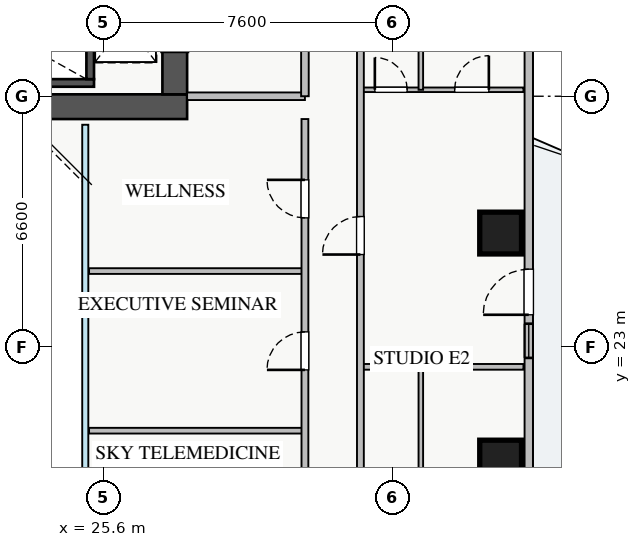
"""IFC4 building model, lengths in metres.
Left out: names, types, materials, properties, quantities, classifications, styles, units other than length and angle.
Written with IfcOpenShell. Run it as: python <this file> out.ifc"""

import sys

from ifc_helpers import new_model, si_unit, direction, frame, frame_2d, origin, origin_2d, place, context, subcontext, project, spatial, rectangle, extrude, source, transform, mapped, element, fill, save


model = new_model("IFC4")
c1 = context("Model", 3, precision=1e-05, world=origin(), true_north=direction((0.0, 1.0)))
c2 = subcontext(c1, "Body", "Model", "MODEL_VIEW")
j1 = project(units=[si_unit("LENGTHUNIT", "METRE"), si_unit("PLANEANGLEUNIT", "RADIAN")], contexts=[c1])
p1 = place(None, origin())
s1 = spatial("IfcSite", under=j1, at=p1, CompositionType="ELEMENT")
p2 = place(p1, origin())
s2 = spatial("IfcBuilding", under=s1, at=p2, CompositionType="ELEMENT")
p3 = place(p2, frame((0.0, 0.0, 106.75)))
s3 = spatial("IfcBuildingStorey", under=s2, at=p3, CompositionType="ELEMENT", Elevation=106.75)
p4 = place(p3, frame((18.2, 29.95, 0.0), z_axis=(0.0, 0.0, 1.0), x_axis=(1.0, 0.0, 0.0)))
e1 = element("IfcWall", 1, at=p4, inside=s3, PredefinedType="SHEAR", context=c2, shape_type="SweptSolid", body=[
    extrude(rectangle(XDim=7.15, YDim=0.2, at=frame_2d((3.575, 0.0))), origin(), (0.0, 0.0, 1.0), 3.25),
])
p5 = place(p3, frame((25.25, 30.05, 0.0), z_axis=(0.0, 0.0, 1.0), x_axis=(0.0, 1.0, 0.0)))
e2 = element("IfcWall", 2, at=p5, inside=s3, PredefinedType="SHEAR", context=c2, shape_type="SweptSolid", body=[
    extrude(rectangle(XDim=2.94, YDim=0.2, at=frame_2d((1.47, 0.0))), origin(), (0.0, 0.0, 1.0), 3.25),
])
p6 = place(p3, frame((10.2, 29.325, 0.0), z_axis=(0.0, 0.0, 1.0), x_axis=(1.0, 0.0, 0.0)))
e3 = element("IfcWall", 3, at=p6, inside=s3, PredefinedType="SHEAR", context=c2, shape_type="SweptSolid", body=[
    extrude(rectangle(XDim=17.6, YDim=0.65, at=frame_2d((8.8, 0.0))), origin(), (0.0, 0.0, 1.0), 3.25),
])
p7 = place(p3, frame((27.475, 29.65, 0.0), z_axis=(0.0, 0.0, 1.0), x_axis=(0.0, 1.0, 0.0)))
e4 = element("IfcWall", 4, at=p7, inside=s3, PredefinedType="SHEAR", context=c2, shape_type="SweptSolid", body=[
    extrude(rectangle(XDim=5.9, YDim=0.65, at=frame_2d((2.95, 0.0))), origin(), (0.0, 0.0, 1.0), 3.25),
])
p8 = place(p7, frame((1.1, 0.0, 0.0)))
e5 = element("IfcOpeningElement", 5, at=p8, cuts=e4, PredefinedType="OPENING", context=c2, shape_type="SweptSolid", body=[
    extrude(rectangle(XDim=1.3, YDim=2.05, at=frame_2d((0.65, 1.025))), frame((0.0, 0.335, 0.0), z_axis=(0.0, -1.0, 0.0), x_axis=(1.0, 0.0, 0.0)), (0.0, 0.0, 1.0), 0.67),
])
m1 = source(origin(), c2, "Body", "SweptSolid", [
    extrude(rectangle(XDim=1.1, YDim=1.1, at=origin_2d()), origin(), (0.0, 0.0, 1.0), 3.25),
])
for number, where, z_axis, x_axis in (
    (6, (36.05, 20.0, 0.0), (0.0, 0.0, 1.0), (1.0, 0.0, 0.0)),
    (7, (36.05, 26.0, 0.0), (0.0, 0.0, 1.0), (1.0, 0.0, 0.0)),
):
    element("IfcColumn", number, at=place(p3, frame(where, z_axis=z_axis, x_axis=x_axis)), inside=s3, PredefinedType="COLUMN", context=c2, shape_type="MappedRepresentation", body=[
        mapped(m1, transform((0.0, 0.0, 0.0), x_axis=(1.0, 0.0, 0.0), y_axis=(0.0, 1.0, 0.0), z_axis=(0.0, 0.0, 1.0), scale=1.0)),
    ])
p9 = place(p3, frame((36.79, 10.55, 0.0), z_axis=(0.0, 0.0, 1.0), x_axis=(0.0, 1.0, 0.0)))
e8 = element("IfcWall", 8, at=p9, inside=s3, PredefinedType="STANDARD", context=c2, shape_type="SweptSolid", body=[
    extrude(rectangle(XDim=24.9, YDim=0.22, at=frame_2d((12.45, 0.0))), origin(), (0.0, 0.0, 1.0), 2.61),
])
p10 = place(p9, frame((13.3, 0.0, 0.0)))
e9 = element("IfcOpeningElement", 9, at=p10, cuts=e8, PredefinedType="OPENING", context=c2, shape_type="SweptSolid", body=[
    extrude(rectangle(XDim=1.2, YDim=2.1, at=frame_2d((0.6, 1.05))), frame((0.0, 0.12, 0.0), z_axis=(0.0, -1.0, 0.0), x_axis=(1.0, 0.0, 0.0)), (0.0, 0.0, 1.0), 0.24),
])
p11 = place(p9, frame((1.912, 0.0, 0.9)))
e10 = element("IfcOpeningElement", 10, at=p11, cuts=e8, PredefinedType="OPENING", context=c2, shape_type="SweptSolid", body=[
    extrude(rectangle(XDim=2.4, YDim=1.48, at=frame_2d((1.2, 0.74))), frame((0.0, 0.12, 0.0), z_axis=(0.0, -1.0, 0.0), x_axis=(1.0, 0.0, 0.0)), (0.0, 0.0, 1.0), 0.24),
])
p12 = place(p9, frame((20.737, 0.0, 0.9)))
e11 = element("IfcOpeningElement", 11, at=p12, cuts=e8, PredefinedType="OPENING", context=c2, shape_type="SweptSolid", body=[
    extrude(rectangle(XDim=2.1, YDim=1.48, at=frame_2d((1.05, 0.74))), frame((0.0, 0.12, 0.0), z_axis=(0.0, -1.0, 0.0), x_axis=(1.0, 0.0, 0.0)), (0.0, 0.0, 1.0), 0.24),
])
p13 = place(p9, frame((12.165, 0.0, 0.9)))
e12 = element("IfcOpeningElement", 12, at=p13, cuts=e8, PredefinedType="OPENING", context=c2, shape_type="SweptSolid", body=[
    extrude(rectangle(XDim=0.9, YDim=1.2, at=frame_2d((0.45, 0.6))), frame((0.0, 0.12, 0.0), z_axis=(0.0, -1.0, 0.0), x_axis=(1.0, 0.0, 0.0)), (0.0, 0.0, 1.0), 0.24),
])
p14 = place(p3, frame((27.8, 29.6, 0.0), z_axis=(0.0, 0.0, 1.0), x_axis=(1.0, 0.0, 0.0)))
e13 = element("IfcWall", 13, at=p14, inside=s3, PredefinedType="PARTITIONING", context=c2, shape_type="SweptSolid", body=[
    extrude(rectangle(XDim=3.1, YDim=0.2, at=frame_2d((1.55, 0.0))), origin(), (0.0, 0.0, 1.0), 3.07),
])
p15 = place(p3, frame((30.9, 29.6, 0.0), z_axis=(0.0, 0.0, 1.0), x_axis=(0.0, 1.0, 0.0)))
e14 = element("IfcWall", 14, at=p15, inside=s3, PredefinedType="PARTITIONING", context=c2, shape_type="SweptSolid", body=[
    extrude(rectangle(XDim=3.9, YDim=0.2, at=frame_2d((1.95, 0.0))), origin(), (0.0, 0.0, 1.0), 3.07),
])
p16 = place(p15, frame((1.4, 0.0, 0.0)))
e15 = element("IfcOpeningElement", 15, at=p16, cuts=e14, PredefinedType="OPENING", context=c2, shape_type="SweptSolid", body=[
    extrude(rectangle(XDim=1.1, YDim=2.05, at=frame_2d((0.55, 1.025))), frame((0.0, 0.11, 0.0), z_axis=(0.0, -1.0, 0.0), x_axis=(1.0, 0.0, 0.0)), (0.0, 0.0, 1.0), 0.22),
])
p17 = place(p3, frame((33.95, 16.75, 0.0), z_axis=(0.0, 0.0, 1.0), x_axis=(0.0, 1.0, 0.0)))
e16 = element("IfcWall", 16, at=p17, inside=s3, PredefinedType="PLUMBINGWALL", context=c2, shape_type="SweptSolid", body=[
    extrude(rectangle(XDim=5.73, YDim=0.12, at=frame_2d((2.865, 0.0))), origin(), (0.0, 0.0, 1.0), 3.07),
])
p18 = place(p3, frame((32.36, 29.77, 0.0), z_axis=(0.0, 0.0, 1.0), x_axis=(1.0, 0.0, 0.0)))
e17 = element("IfcWall", 17, at=p18, inside=s3, PredefinedType="PLUMBINGWALL", context=c2, shape_type="SweptSolid", body=[
    extrude(rectangle(XDim=4.29, YDim=0.12, at=frame_2d((2.145, 0.0))), origin(), (0.0, 0.0, 1.0), 3.07),
])
p19 = place(p18, frame((0.38, 0.0, 0.0)))
e18 = element("IfcOpeningElement", 18, at=p19, cuts=e17, PredefinedType="OPENING", context=c2, shape_type="SweptSolid", body=[
    extrude(rectangle(XDim=0.85, YDim=2.05, at=frame_2d((0.425, 1.025))), frame((0.0, 0.07, 0.0), z_axis=(0.0, -1.0, 0.0), x_axis=(1.0, 0.0, 0.0)), (0.0, 0.0, 1.0), 0.14),
])
p20 = place(p18, frame((2.48, 0.0, 0.0)))
e19 = element("IfcOpeningElement", 19, at=p20, cuts=e17, PredefinedType="OPENING", context=c2, shape_type="SweptSolid", body=[
    extrude(rectangle(XDim=0.9, YDim=2.05, at=frame_2d((0.45, 1.025))), frame((0.0, 0.07, 0.0), z_axis=(0.0, -1.0, 0.0), x_axis=(1.0, 0.0, 0.0)), (0.0, 0.0, 1.0), 0.14),
])
p21 = place(p3, frame((33.95, 29.77, 0.0), z_axis=(0.0, 0.0, 1.0), x_axis=(0.0, 1.0, 0.0)))
e20 = element("IfcWall", 20, at=p21, inside=s3, PredefinedType="PLUMBINGWALL", context=c2, shape_type="SweptSolid", body=[
    extrude(rectangle(XDim=6.21, YDim=0.12, at=frame_2d((3.105, 0.0))), origin(), (0.0, 0.0, 1.0), 3.07),
])
p22 = place(p3, frame((32.36, 22.48, 0.0), z_axis=(0.0, 0.0, 1.0), x_axis=(1.0, 0.0, 0.0)))
e21 = element("IfcWall", 21, at=p22, inside=s3, PredefinedType="PARTITIONING", context=c2, shape_type="SweptSolid", body=[
    extrude(rectangle(XDim=4.29, YDim=0.15, at=frame_2d((2.145, 0.0))), origin(), (0.0, 0.0, 1.0), 3.07),
])
p23 = place(p3, frame((32.36, 8.3, 0.0), z_axis=(0.0, 0.0, 1.0), x_axis=(0.0, 1.0, 0.0)))
e22 = element("IfcWall", 22, at=p23, inside=s3, PredefinedType="PARTITIONING", context=c2, shape_type="SweptSolid", body=[
    extrude(rectangle(XDim=29.4, YDim=0.18, at=frame_2d((14.7, 0.0))), origin(), (0.0, 0.0, 1.0), 3.07),
])
p24 = place(p23, frame((28.08, 0.0, 0.0)))
e23 = element("IfcOpeningElement", 23, at=p24, cuts=e22, PredefinedType="OPENING", context=c2, shape_type="SweptSolid", body=[
    extrude(rectangle(XDim=0.9, YDim=2.05, at=frame_2d((0.45, 1.025))), frame((0.0, 0.1, 0.0), z_axis=(0.0, -1.0, 0.0), x_axis=(1.0, 0.0, 0.0)), (0.0, 0.0, 1.0), 0.2),
])
p25 = place(p23, frame((0.42, 0.0, 0.0)))
e24 = element("IfcOpeningElement", 24, at=p25, cuts=e22, PredefinedType="OPENING", context=c2, shape_type="SweptSolid", body=[
    extrude(rectangle(XDim=0.9, YDim=2.05, at=frame_2d((0.45, 1.025))), frame((0.0, 0.1, 0.0), z_axis=(0.0, -1.0, 0.0), x_axis=(1.0, 0.0, 0.0)), (0.0, 0.0, 1.0), 0.2),
])
p26 = place(p23, frame((4.395, 0.0, 0.0)))
e25 = element("IfcOpeningElement", 25, at=p26, cuts=e22, PredefinedType="OPENING", context=c2, shape_type="SweptSolid", body=[
    extrude(rectangle(XDim=1.0, YDim=2.05, at=frame_2d((0.5, 1.025))), frame((0.0, 0.1, 0.0), z_axis=(0.0, -1.0, 0.0), x_axis=(1.0, 0.0, 0.0)), (0.0, 0.0, 1.0), 0.2),
])
p27 = place(p23, frame((17.135, 0.0, 0.0)))
e26 = element("IfcOpeningElement", 26, at=p27, cuts=e22, PredefinedType="OPENING", context=c2, shape_type="SweptSolid", body=[
    extrude(rectangle(XDim=1.0, YDim=2.05, at=frame_2d((0.5, 1.025))), frame((0.0, 0.1, 0.0), z_axis=(0.0, -1.0, 0.0), x_axis=(1.0, 0.0, 0.0)), (0.0, 0.0, 1.0), 0.2),
])
for number, where, z_axis, x_axis in (
    (27, (25.22, 20.8, 0.0), (0.0, 0.0, 1.0), (1.0, 0.0, 0.0)),
    (28, (25.22, 25.0, 0.0), (0.0, 0.0, 1.0), (1.0, 0.0, 0.0)),
):
    element("IfcWall", number, at=place(p3, frame(where, z_axis=z_axis, x_axis=x_axis)), inside=s3, PredefinedType="PARTITIONING", context=c2, shape_type="SweptSolid", body=[
        extrude(rectangle(XDim=5.68, YDim=0.15, at=frame_2d((2.84, 0.0))), origin(), (0.0, 0.0, 1.0), 3.07),
    ])
p28 = place(p3, frame((30.9, 17.0, 0.0), z_axis=(0.0, 0.0, 1.0), x_axis=(0.0, 1.0, 0.0)))
e29 = element("IfcWall", 29, at=p28, inside=s3, PredefinedType="PARTITIONING", context=c2, shape_type="SweptSolid", body=[
    extrude(rectangle(XDim=12.0, YDim=0.18, at=frame_2d((6.0, 0.0))), origin(), (0.0, 0.0, 1.0), 3.07),
])
p29 = place(p28, frame((1.4, 0.0, 0.0)))
e30 = element("IfcOpeningElement", 30, at=p29, cuts=e29, PredefinedType="OPENING", context=c2, shape_type="SweptSolid", body=[
    extrude(rectangle(XDim=1.0, YDim=2.05, at=frame_2d((0.5, 1.025))), frame((0.0, 0.1, 0.0), z_axis=(0.0, -1.0, 0.0), x_axis=(1.0, 0.0, 0.0)), (0.0, 0.0, 1.0), 0.2),
])
p30 = place(p28, frame((5.4, 0.0, 0.0)))
e31 = element("IfcOpeningElement", 31, at=p30, cuts=e29, PredefinedType="OPENING", context=c2, shape_type="SweptSolid", body=[
    extrude(rectangle(XDim=1.0, YDim=2.05, at=frame_2d((0.5, 1.025))), frame((0.0, 0.1, 0.0), z_axis=(0.0, -1.0, 0.0), x_axis=(1.0, 0.0, 0.0)), (0.0, 0.0, 1.0), 0.2),
])
p31 = place(p28, frame((9.4, 0.0, 0.0)))
e32 = element("IfcOpeningElement", 32, at=p31, cuts=e29, PredefinedType="OPENING", context=c2, shape_type="SweptSolid", body=[
    extrude(rectangle(XDim=1.0, YDim=2.05, at=frame_2d((0.5, 1.025))), frame((0.0, 0.1, 0.0), z_axis=(0.0, -1.0, 0.0), x_axis=(1.0, 0.0, 0.0)), (0.0, 0.0, 1.0), 0.2),
])
m2 = source(origin(), c2, "Body", "SweptSolid", [
    extrude(rectangle(XDim=1.2, YDim=2.1, at=frame_2d((0.6, 1.05))), frame((0.0, 0.025, 0.0), z_axis=(0.0, -1.0, 0.0), x_axis=(1.0, 0.0, 0.0)), (0.0, 0.0, 1.0), 0.05),
])
p32 = place(p10, origin())
e33 = element("IfcDoor", 33, at=p32, inside=s3, OperationType="SINGLE_SWING_LEFT", PredefinedType="DOOR", context=c2, shape_type="MappedRepresentation", body=[
    mapped(m2, transform((0.0, 0.0, 0.0), x_axis=(1.0, 0.0, 0.0), y_axis=(0.0, 1.0, 0.0), z_axis=(0.0, 0.0, 1.0), scale=1.0)),
])
fill(e9, e33)
m3 = source(origin(), c2, "Body", "SweptSolid", [
    extrude(rectangle(XDim=1.3, YDim=2.05, at=frame_2d((0.65, 1.025))), frame((0.0, 0.025, 0.0), z_axis=(0.0, -1.0, 0.0), x_axis=(1.0, 0.0, 0.0)), (0.0, 0.0, 1.0), 0.05),
])
p33 = place(p8, origin())
e34 = element("IfcDoor", 34, at=p33, inside=s3, OperationType="SLIDING_TO_LEFT", PredefinedType="DOOR", context=c2, shape_type="MappedRepresentation", body=[
    mapped(m3, transform((0.0, 0.0, 0.0), x_axis=(1.0, 0.0, 0.0), y_axis=(0.0, 1.0, 0.0), z_axis=(0.0, 0.0, 1.0), scale=1.0)),
])
fill(e5, e34)
m4 = source(origin(), c2, "Body", "SweptSolid", [
    extrude(rectangle(XDim=0.85, YDim=2.05, at=frame_2d((0.425, 1.025))), frame((0.0, 0.025, 0.0), z_axis=(0.0, -1.0, 0.0), x_axis=(1.0, 0.0, 0.0)), (0.0, 0.0, 1.0), 0.05),
])
p34 = place(p19, origin())
e35 = element("IfcDoor", 35, at=p34, inside=s3, OperationType="SINGLE_SWING_LEFT", PredefinedType="DOOR", context=c2, shape_type="MappedRepresentation", body=[
    mapped(m4, transform((0.0, 0.0, 0.0), x_axis=(1.0, 0.0, 0.0), y_axis=(0.0, 1.0, 0.0), z_axis=(0.0, 0.0, 1.0), scale=1.0)),
])
fill(e18, e35)
m5 = source(origin(), c2, "Body", "SweptSolid", [
    extrude(rectangle(XDim=0.9, YDim=2.05, at=frame_2d((0.45, 1.025))), frame((0.0, 0.025, 0.0), z_axis=(0.0, -1.0, 0.0), x_axis=(1.0, 0.0, 0.0)), (0.0, 0.0, 1.0), 0.05),
])
p35 = place(p20, origin())
e36 = element("IfcDoor", 36, at=p35, inside=s3, OperationType="SINGLE_SWING_RIGHT", PredefinedType="DOOR", context=c2, shape_type="MappedRepresentation", body=[
    mapped(m5, transform((0.0, 0.0, 0.0), x_axis=(1.0, 0.0, 0.0), y_axis=(0.0, 1.0, 0.0), z_axis=(0.0, 0.0, 1.0), scale=1.0)),
])
fill(e19, e36)
m6 = source(origin(), c2, "Body", "SweptSolid", [
    extrude(rectangle(XDim=1.0, YDim=2.05, at=frame_2d((0.5, 1.025))), frame((0.0, 0.025, 0.0), z_axis=(0.0, -1.0, 0.0), x_axis=(1.0, 0.0, 0.0)), (0.0, 0.0, 1.0), 0.05),
])
p36 = place(p27, origin())
e37 = element("IfcDoor", 37, at=p36, inside=s3, OperationType="SINGLE_SWING_LEFT", PredefinedType="DOOR", context=c2, shape_type="MappedRepresentation", body=[
    mapped(m6, transform((0.0, 0.0, 0.0), x_axis=(1.0, 0.0, 0.0), y_axis=(0.0, 1.0, 0.0), z_axis=(0.0, 0.0, 1.0), scale=1.0)),
])
fill(e26, e37)
p37 = place(p30, origin())
e38 = element("IfcDoor", 38, at=p37, inside=s3, OperationType="SINGLE_SWING_LEFT", PredefinedType="DOOR", context=c2, shape_type="MappedRepresentation", body=[
    mapped(m6, transform((0.0, 0.0, 0.0), x_axis=(1.0, 0.0, 0.0), y_axis=(0.0, 1.0, 0.0), z_axis=(0.0, 0.0, 1.0), scale=1.0)),
])
fill(e31, e38)
p38 = place(p31, origin())
e39 = element("IfcDoor", 39, at=p38, inside=s3, OperationType="SINGLE_SWING_RIGHT", PredefinedType="DOOR", context=c2, shape_type="MappedRepresentation", body=[
    mapped(m6, transform((0.0, 0.0, 0.0), x_axis=(1.0, 0.0, 0.0), y_axis=(0.0, 1.0, 0.0), z_axis=(0.0, 0.0, 1.0), scale=1.0)),
])
fill(e32, e39)
m7 = source(origin(), c2, "Body", "SweptSolid", [
    extrude(rectangle(XDim=0.9, YDim=1.2, at=frame_2d((0.45, 0.6))), frame((0.0, 0.03, 0.0), z_axis=(0.0, -1.0, 0.0), x_axis=(1.0, 0.0, 0.0)), (0.0, 0.0, 1.0), 0.06),
])
p39 = place(p13, origin())
e40 = element("IfcWindow", 40, at=p39, inside=s3, PartitioningType="SINGLE_PANEL", PredefinedType="WINDOW", context=c2, shape_type="MappedRepresentation", body=[
    mapped(m7, transform((0.0, 0.0, 0.0), x_axis=(1.0, 0.0, 0.0), y_axis=(0.0, 1.0, 0.0), z_axis=(0.0, 0.0, 1.0), scale=1.0)),
])
fill(e12, e40)
save(model, sys.argv[1])
